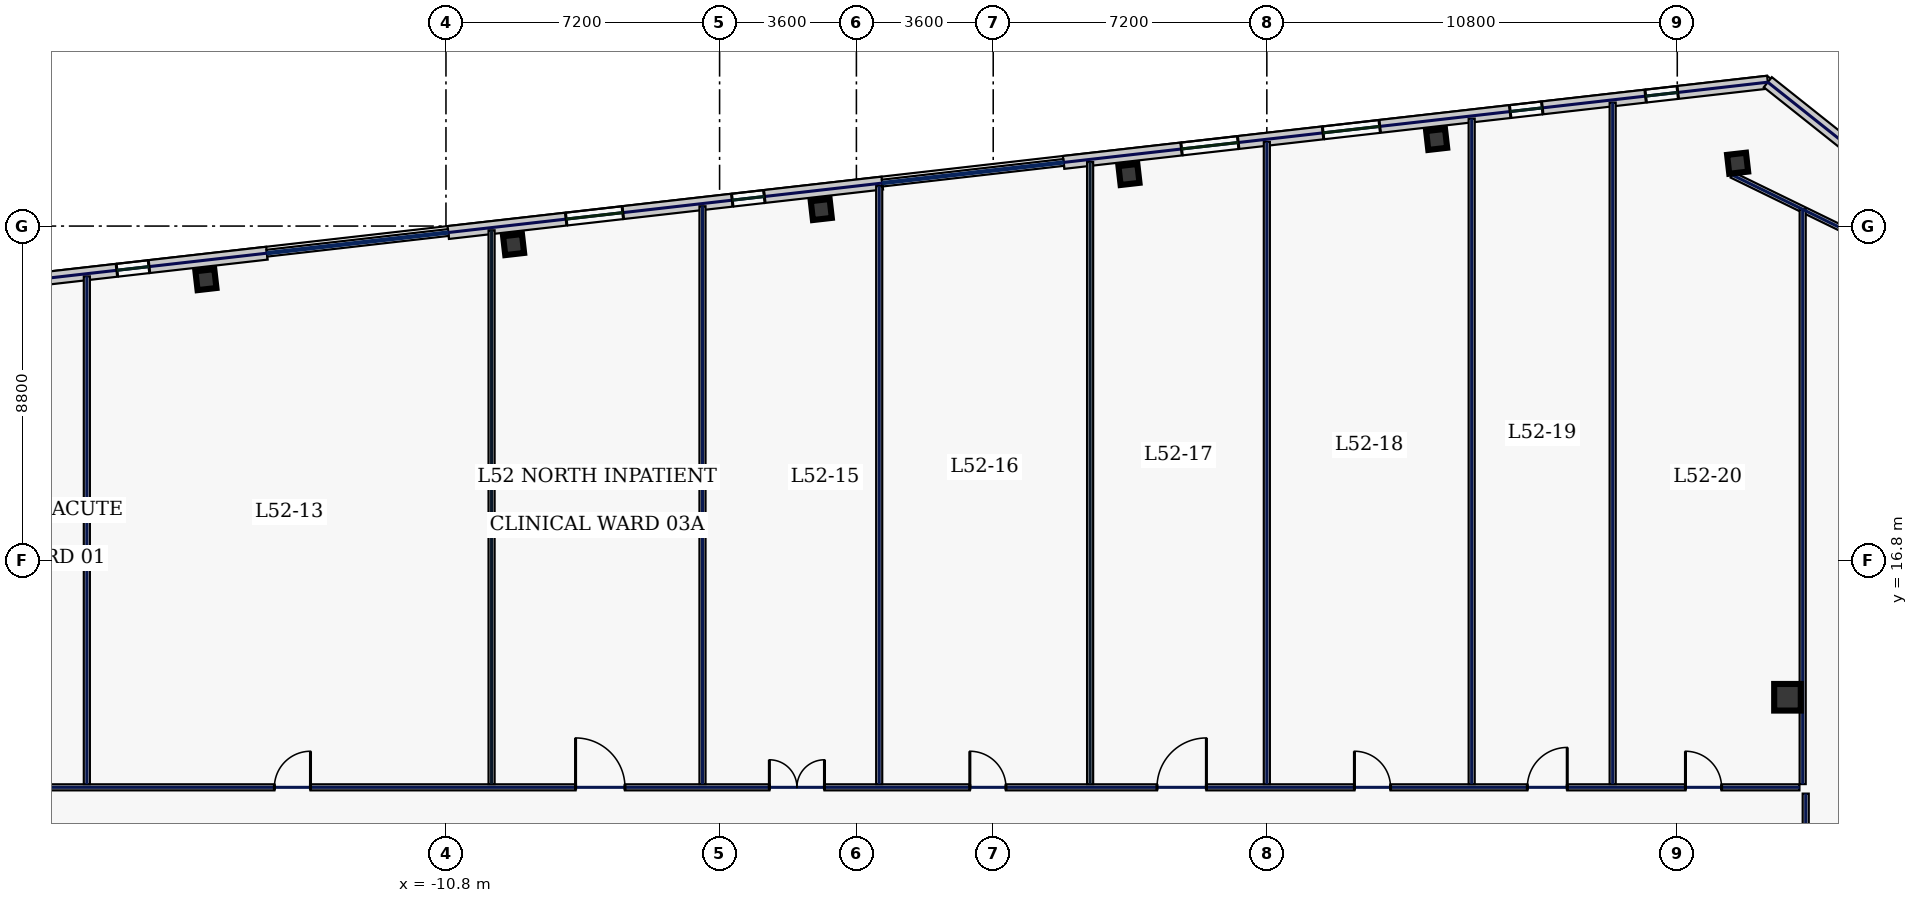
"""IFC4 building model, lengths in metres.
Left out: names, types, materials, properties, quantities, classifications, styles, units other than length and angle.
Written with IfcOpenShell. Run it as: python <this file> out.ifc"""

import sys

from ifc_helpers import new_model, si_unit, direction, frame, frame_2d, origin, origin_2d, place, context, subcontext, project, spatial, rectangle, hollow_rectangle, extrude, element, fill, save


model = new_model("IFC4")
c1 = context("Model", 3, precision=1e-05, world=origin(), true_north=direction((0.0, 1.0)))
c2 = subcontext(c1, "Body", "Model", "MODEL_VIEW")
j1 = project(units=[si_unit("LENGTHUNIT", "METRE"), si_unit("PLANEANGLEUNIT", "RADIAN")], contexts=[c1])
p1 = place(None, origin())
s1 = spatial("IfcSite", under=j1, at=p1, CompositionType="ELEMENT")
p2 = place(p1, origin())
s2 = spatial("IfcBuilding", under=s1, at=p2, CompositionType="ELEMENT")
p3 = place(p2, frame((0.0, 0.0, 226.2)))
s3 = spatial("IfcBuildingStorey", under=s2, at=p3, CompositionType="ELEMENT", Elevation=226.2)
p4 = place(p3, frame((24.5, 13.2, 0.0), z_axis=(0.0, 0.0, 1.0), x_axis=(1.0, 0.0, 0.0)))
e1 = element("IfcColumn", 1, at=p4, inside=s3, PredefinedType="COLUMN", context=c2, shape_type="SweptSolid", body=[
    extrude(hollow_rectangle(XDim=0.7, YDim=0.7, WallThickness=0.032, at=origin_2d()), origin(), (0.0, 0.0, 1.0), 3.74),
])
for number, where, z_axis, x_axis in (
    (2, (23.188, 27.253, 0.0), (0.0, 0.0, 1.0), (0.994, 0.113, 0.0)),
    (3, (15.269, 27.88, 0.0), (0.0, 0.0, 1.0), (0.994, 0.113, 0.0)),
    (4, (7.172, 26.958, 0.0), (0.0, 0.0, 1.0), (0.994, 0.113, 0.0)),
    (5, (-0.924, 26.035, 0.0), (0.0, 0.0, 1.0), (0.994, 0.113, 0.0)),
    (6, (-9.02, 25.113, 0.0), (0.0, 0.0, 1.0), (0.994, 0.113, 0.0)),
    (7, (-17.116, 24.19, 0.0), (0.0, 0.0, 1.0), (0.994, 0.113, 0.0)),
):
    element("IfcColumn", number, at=place(p3, frame(where, z_axis=z_axis, x_axis=x_axis)), inside=s3, PredefinedType="COLUMN", context=c2, shape_type="SweptSolid", body=[
        extrude(hollow_rectangle(XDim=0.5, YDim=0.5, WallThickness=0.025, at=origin_2d()), origin(), (0.0, 0.0, 1.0), 3.74),
    ])
p5 = place(p3, frame((23.983, 29.386, 0.0), z_axis=(0.0, 0.0, 1.0), x_axis=(-0.993572271362, -0.113199565282, 0.0)))
e8 = element("IfcWall", 8, at=p5, inside=s3, PredefinedType="STANDARD", context=c2, shape_type="SweptSolid", body=[
    extrude(rectangle(XDim=18.651, YDim=0.34, at=frame_2d((9.326, 0.0))), origin(), (0.0, 0.0, 1.0), 3.74),
])
p6 = place(p5, frame((14.027, 0.0, 0.83)))
e9 = element("IfcOpeningElement", 9, at=p6, cuts=e8, PredefinedType="OPENING", context=c2, shape_type="SweptSolid", body=[
    extrude(rectangle(XDim=1.5, YDim=2.0, at=frame_2d((0.75, 1.0))), frame((0.0, 0.18, 0.0), z_axis=(0.0, -1.0, 0.0), x_axis=(1.0, 0.0, 0.0)), (0.0, 0.0, 1.0), 0.36),
])
p7 = place(p5, frame((10.279, 0.0, 0.83)))
e10 = element("IfcOpeningElement", 10, at=p7, cuts=e8, PredefinedType="OPENING", context=c2, shape_type="SweptSolid", body=[
    extrude(rectangle(XDim=1.5, YDim=2.0, at=frame_2d((0.75, 1.0))), frame((0.0, 0.18, 0.0), z_axis=(0.0, -1.0, 0.0), x_axis=(1.0, 0.0, 0.0)), (0.0, 0.0, 1.0), 0.36),
])
p8 = place(p5, frame((5.973, 0.0, 0.83)))
e11 = element("IfcOpeningElement", 11, at=p8, cuts=e8, PredefinedType="OPENING", context=c2, shape_type="SweptSolid", body=[
    extrude(rectangle(XDim=0.85, YDim=1.85, at=frame_2d((0.425, 0.925))), frame((0.0, 0.18, 0.0), z_axis=(0.0, -1.0, 0.0), x_axis=(1.0, 0.0, 0.0)), (0.0, 0.0, 1.0), 0.36),
])
p9 = place(p5, frame((2.386, 0.0, 0.83)))
e12 = element("IfcOpeningElement", 12, at=p9, cuts=e8, PredefinedType="OPENING", context=c2, shape_type="SweptSolid", body=[
    extrude(rectangle(XDim=0.85, YDim=1.85, at=frame_2d((0.425, 0.925))), frame((0.0, 0.18, 0.0), z_axis=(0.0, -1.0, 0.0), x_axis=(1.0, 0.0, 0.0)), (0.0, 0.0, 1.0), 0.36),
])
p10 = place(p3, frame((0.682, 26.731, 0.0), z_axis=(0.0, 0.0, 1.0), x_axis=(-0.993571968199, -0.113202226169, 0.0)))
e13 = element("IfcWall", 13, at=p10, inside=s3, PredefinedType="STANDARD", context=c2, shape_type="SweptSolid", body=[
    extrude(rectangle(XDim=11.497, YDim=0.34, at=frame_2d((5.749, 0.0))), origin(), (0.0, 0.0, 1.0), 3.74),
])
p11 = place(p10, frame((6.873, 0.0, 0.83)))
e14 = element("IfcOpeningElement", 14, at=p11, cuts=e13, PredefinedType="OPENING", context=c2, shape_type="SweptSolid", body=[
    extrude(rectangle(XDim=1.5, YDim=2.0, at=frame_2d((0.75, 1.0))), frame((0.0, 0.18, 0.0), z_axis=(0.0, -1.0, 0.0), x_axis=(1.0, 0.0, 0.0)), (0.0, 0.0, 1.0), 0.36),
])
p12 = place(p10, frame((3.125, 0.0, 0.83)))
e15 = element("IfcOpeningElement", 15, at=p12, cuts=e13, PredefinedType="OPENING", context=c2, shape_type="SweptSolid", body=[
    extrude(rectangle(XDim=0.85, YDim=1.85, at=frame_2d((0.425, 0.925))), frame((0.0, 0.18, 0.0), z_axis=(0.0, -1.0, 0.0), x_axis=(1.0, 0.0, 0.0)), (0.0, 0.0, 1.0), 0.36),
])
p13 = place(p3, frame((-15.51, 24.886, 0.0), z_axis=(0.0, 0.0, 1.0), x_axis=(-0.993572271362, -0.113199565282, 0.0)))
e16 = element("IfcWall", 16, at=p13, inside=s3, PredefinedType="STANDARD", context=c2, shape_type="SweptSolid", body=[
    extrude(rectangle(XDim=18.651, YDim=0.34, at=frame_2d((9.326, 0.0))), origin(), (0.0, 0.0, 1.0), 3.74),
])
p14 = place(p13, frame((15.021, 0.0, 0.83)))
e17 = element("IfcOpeningElement", 17, at=p14, cuts=e16, PredefinedType="OPENING", context=c2, shape_type="SweptSolid", body=[
    extrude(rectangle(XDim=1.5, YDim=2.0, at=frame_2d((0.75, 1.0))), frame((0.0, 0.18, 0.0), z_axis=(0.0, -1.0, 0.0), x_axis=(1.0, 0.0, 0.0)), (0.0, 0.0, 1.0), 0.36),
])
p15 = place(p13, frame((11.273, 0.0, 0.83)))
e18 = element("IfcOpeningElement", 18, at=p15, cuts=e16, PredefinedType="OPENING", context=c2, shape_type="SweptSolid", body=[
    extrude(rectangle(XDim=1.5, YDim=2.0, at=frame_2d((0.75, 1.0))), frame((0.0, 0.18, 0.0), z_axis=(0.0, -1.0, 0.0), x_axis=(1.0, 0.0, 0.0)), (0.0, 0.0, 1.0), 0.36),
])
p16 = place(p13, frame((6.873, 0.0, 0.83)))
e19 = element("IfcOpeningElement", 19, at=p16, cuts=e16, PredefinedType="OPENING", context=c2, shape_type="SweptSolid", body=[
    extrude(rectangle(XDim=1.5, YDim=2.0, at=frame_2d((0.75, 1.0))), frame((0.0, 0.18, 0.0), z_axis=(0.0, -1.0, 0.0), x_axis=(1.0, 0.0, 0.0)), (0.0, 0.0, 1.0), 0.36),
])
p17 = place(p13, frame((3.125, 0.0, 0.83)))
e20 = element("IfcOpeningElement", 20, at=p17, cuts=e16, PredefinedType="OPENING", context=c2, shape_type="SweptSolid", body=[
    extrude(rectangle(XDim=0.85, YDim=1.85, at=frame_2d((0.425, 0.925))), frame((0.0, 0.18, 0.0), z_axis=(0.0, -1.0, 0.0), x_axis=(1.0, 0.0, 0.0)), (0.0, 0.0, 1.0), 0.36),
])
p18 = place(p3, frame((29.107, 25.31, 0.0), z_axis=(0.0, 0.0, 1.0), x_axis=(-0.78259733853, 0.62252823689, 0.0)))
e21 = element("IfcWall", 21, at=p18, inside=s3, PredefinedType="STANDARD", context=c2, shape_type="SweptSolid", body=[
    extrude(rectangle(XDim=6.548, YDim=0.34, at=frame_2d((3.274, 0.0))), origin(), (0.0, 0.0, 1.0), 3.74),
])
p19 = place(p3, frame((28.528, 24.271, 0.0), z_axis=(0.0, 0.0, 1.0), x_axis=(-0.898820692789, 0.438316509173, 0.0)))
e22 = element("IfcWall", 22, at=p19, inside=s3, PredefinedType="PARTITIONING", context=c2, shape_type="SweptSolid", body=[
    extrude(rectangle(XDim=6.107, YDim=0.16, at=frame_2d((3.053, 0.0))), origin(), (0.0, 0.0, 1.0), 3.74),
])
p20 = place(p3, frame((-24.815, 10.83, 0.0), z_axis=(0.0, 0.0, 1.0), x_axis=(1.0, 0.0, 0.0)))
e23 = element("IfcWall", 23, at=p20, inside=s3, PredefinedType="PARTITIONING", context=c2, shape_type="SweptSolid", body=[
    extrude(rectangle(XDim=49.63, YDim=0.16, at=frame_2d((24.815, 0.0))), origin(), (0.0, 0.0, 1.0), 3.74),
])
p21 = place(p20, frame((1.869, 0.0, 0.0)))
e24 = element("IfcOpeningElement", 24, at=p21, cuts=e23, PredefinedType="OPENING", context=c2, shape_type="SweptSolid", body=[
    extrude(rectangle(XDim=1.3, YDim=2.2, at=frame_2d((0.65, 1.1))), frame((0.0, 0.09, 0.0), z_axis=(0.0, -1.0, 0.0), x_axis=(1.0, 0.0, 0.0)), (0.0, 0.0, 1.0), 0.18),
])
p22 = place(p20, frame((9.5, 0.0, 0.0)))
e25 = element("IfcOpeningElement", 25, at=p22, cuts=e23, PredefinedType="OPENING", context=c2, shape_type="SweptSolid", body=[
    extrude(rectangle(XDim=0.95, YDim=2.2, at=frame_2d((0.475, 1.1))), frame((0.0, 0.09, 0.0), z_axis=(0.0, -1.0, 0.0), x_axis=(1.0, 0.0, 0.0)), (0.0, 0.0, 1.0), 0.18),
])
p23 = place(p20, frame((17.425, 0.0, 0.0)))
e26 = element("IfcOpeningElement", 26, at=p23, cuts=e23, PredefinedType="OPENING", context=c2, shape_type="SweptSolid", body=[
    extrude(rectangle(XDim=1.3, YDim=2.2, at=frame_2d((0.65, 1.1))), frame((0.0, 0.09, 0.0), z_axis=(0.0, -1.0, 0.0), x_axis=(1.0, 0.0, 0.0)), (0.0, 0.0, 1.0), 0.18),
])
p24 = place(p20, frame((22.525, 0.0, 0.0)))
e27 = element("IfcOpeningElement", 27, at=p24, cuts=e23, PredefinedType="OPENING", context=c2, shape_type="SweptSolid", body=[
    extrude(rectangle(XDim=1.45, YDim=2.2, at=frame_2d((0.725, 1.1))), frame((0.0, 0.09, 0.0), z_axis=(0.0, -1.0, 0.0), x_axis=(1.0, 0.0, 0.0)), (0.0, 0.0, 1.0), 0.18),
])
p25 = place(p20, frame((27.8, 0.0, 0.0)))
e28 = element("IfcOpeningElement", 28, at=p25, cuts=e23, PredefinedType="OPENING", context=c2, shape_type="SweptSolid", body=[
    extrude(rectangle(XDim=0.95, YDim=2.2, at=frame_2d((0.475, 1.1))), frame((0.0, 0.09, 0.0), z_axis=(0.0, -1.0, 0.0), x_axis=(1.0, 0.0, 0.0)), (0.0, 0.0, 1.0), 0.18),
])
p26 = place(p20, frame((32.725, 0.0, 0.0)))
e29 = element("IfcOpeningElement", 29, at=p26, cuts=e23, PredefinedType="OPENING", context=c2, shape_type="SweptSolid", body=[
    extrude(rectangle(XDim=1.3, YDim=2.2, at=frame_2d((0.65, 1.1))), frame((0.0, 0.09, 0.0), z_axis=(0.0, -1.0, 0.0), x_axis=(1.0, 0.0, 0.0)), (0.0, 0.0, 1.0), 0.18),
])
p27 = place(p20, frame((37.92, 0.0, 0.0)))
e30 = element("IfcOpeningElement", 30, at=p27, cuts=e23, PredefinedType="OPENING", context=c2, shape_type="SweptSolid", body=[
    extrude(rectangle(XDim=0.95, YDim=2.2, at=frame_2d((0.475, 1.1))), frame((0.0, 0.09, 0.0), z_axis=(0.0, -1.0, 0.0), x_axis=(1.0, 0.0, 0.0)), (0.0, 0.0, 1.0), 0.18),
])
p28 = place(p20, frame((42.47, 0.0, 0.0)))
e31 = element("IfcOpeningElement", 31, at=p28, cuts=e23, PredefinedType="OPENING", context=c2, shape_type="SweptSolid", body=[
    extrude(rectangle(XDim=1.05, YDim=2.2, at=frame_2d((0.525, 1.1))), frame((0.0, 0.09, 0.0), z_axis=(0.0, -1.0, 0.0), x_axis=(1.0, 0.0, 0.0)), (0.0, 0.0, 1.0), 0.18),
])
p29 = place(p20, frame((46.631, 0.0, 0.0)))
e32 = element("IfcOpeningElement", 32, at=p29, cuts=e23, PredefinedType="OPENING", context=c2, shape_type="SweptSolid", body=[
    extrude(rectangle(XDim=0.95, YDim=2.2, at=frame_2d((0.475, 1.1))), frame((0.0, 0.09, 0.0), z_axis=(0.0, -1.0, 0.0), x_axis=(1.0, 0.0, 0.0)), (0.0, 0.0, 1.0), 0.18),
])
p30 = place(p3, frame((24.98, 10.665, 0.0), z_axis=(0.0, 0.0, 1.0), x_axis=(0.0, -1.0, 0.0)))
e33 = element("IfcWall", 33, at=p30, inside=s3, PredefinedType="PARTITIONING", context=c2, shape_type="SweptSolid", body=[
    extrude(rectangle(XDim=2.98, YDim=0.16, at=frame_2d((1.49, 0.0))), origin(), (0.0, 0.0, 1.0), 3.74),
])
p31 = place(p30, frame((1.1, 0.0, 0.0)))
e34 = element("IfcOpeningElement", 34, at=p31, cuts=e33, PredefinedType="OPENING", context=c2, shape_type="SweptSolid", body=[
    extrude(rectangle(XDim=0.95, YDim=2.2, at=frame_2d((0.475, 1.1))), frame((0.0, 0.09, 0.0), z_axis=(0.0, -1.0, 0.0), x_axis=(1.0, 0.0, 0.0)), (0.0, 0.0, 1.0), 0.18),
])
p32 = place(p3, frame((24.9, 10.915, 0.0), z_axis=(0.0, 0.0, 1.0), x_axis=(0.0, 1.0, 0.0)))
e35 = element("IfcWall", 35, at=p32, inside=s3, PredefinedType="PARTITIONING", context=c2, shape_type="SweptSolid", body=[
    extrude(rectangle(XDim=15.129, YDim=0.16, at=frame_2d((7.565, 0.0))), origin(), (0.0, 0.0, 1.0), 3.74),
])
p33 = place(p3, frame((-20.25, 10.915, 0.0), z_axis=(0.0, 0.0, 1.0), x_axis=(0.0, 1.0, 0.0)))
e36 = element("IfcWall", 36, at=p33, inside=s3, PredefinedType="PARTITIONING", context=c2, shape_type="SweptSolid", body=[
    extrude(rectangle(XDim=13.361, YDim=0.16, at=frame_2d((6.681, 0.0))), origin(), (0.0, 0.0, 1.0), 3.74),
])
p34 = place(p3, frame((-9.6, 10.915, 0.0), z_axis=(0.0, 0.0, 1.0), x_axis=(0.0, 1.0, 0.0)))
e37 = element("IfcWall", 37, at=p34, inside=s3, PredefinedType="PARTITIONING", context=c2, shape_type="SweptSolid", body=[
    extrude(rectangle(XDim=14.574, YDim=0.16, at=frame_2d((7.287, 0.0))), origin(), (0.0, 0.0, 1.0), 1.535),
])
p35 = place(p3, frame((0.6, 10.915, 0.0), z_axis=(0.0, 0.0, 1.0), x_axis=(0.0, 1.0, 0.0)))
e38 = element("IfcWall", 38, at=p35, inside=s3, PredefinedType="PARTITIONING", context=c2, shape_type="SweptSolid", body=[
    extrude(rectangle(XDim=15.737, YDim=0.16, at=frame_2d((7.868, 0.0))), origin(), (0.0, 0.0, 1.0), 3.74),
])
p36 = place(p3, frame((10.8, 10.915, 0.0), z_axis=(0.0, 0.0, 1.0), x_axis=(0.0, 1.0, 0.0)))
e39 = element("IfcWall", 39, at=p36, inside=s3, PredefinedType="PARTITIONING", context=c2, shape_type="SweptSolid", body=[
    extrude(rectangle(XDim=16.899, YDim=0.16, at=frame_2d((8.449, 0.0))), origin(), (0.0, 0.0, 1.0), 3.74),
])
p37 = place(p3, frame((19.9, 10.915, 0.0), z_axis=(0.0, 0.0, 1.0), x_axis=(0.0, 1.0, 0.0)))
e40 = element("IfcWall", 40, at=p37, inside=s3, PredefinedType="PARTITIONING", context=c2, shape_type="SweptSolid", body=[
    extrude(rectangle(XDim=17.936, YDim=0.16, at=frame_2d((8.968, 0.0))), origin(), (0.0, 0.0, 1.0), 3.74),
])
p38 = place(p3, frame((-4.05, 10.915, 0.0), z_axis=(0.0, 0.0, 1.0), x_axis=(0.0, 1.0, 0.0)))
e41 = element("IfcWall", 41, at=p38, inside=s3, PredefinedType="PARTITIONING", context=c2, shape_type="SweptSolid", body=[
    extrude(rectangle(XDim=15.207, YDim=0.16, at=frame_2d((7.604, 0.0))), origin(), (0.0, 0.0, 1.0), 3.74),
])
p39 = place(p3, frame((6.15, 10.915, 0.0), z_axis=(0.0, 0.0, 1.0), x_axis=(0.0, 1.0, 0.0)))
e42 = element("IfcWall", 42, at=p39, inside=s3, PredefinedType="PARTITIONING", context=c2, shape_type="SweptSolid", body=[
    extrude(rectangle(XDim=16.369, YDim=0.16, at=frame_2d((8.185, 0.0))), origin(), (0.0, 0.0, 1.0), 1.535),
])
p40 = place(p3, frame((16.19, 10.915, 0.0), z_axis=(0.0, 0.0, 1.0), x_axis=(0.0, 1.0, 0.0)))
e43 = element("IfcWall", 43, at=p40, inside=s3, PredefinedType="PARTITIONING", context=c2, shape_type="SweptSolid", body=[
    extrude(rectangle(XDim=17.513, YDim=0.16, at=frame_2d((8.756, 0.0))), origin(), (0.0, 0.0, 1.0), 3.74),
])
p41 = place(p6, origin())
e44 = element("IfcWindow", 44, at=p41, inside=s3, PartitioningType="SINGLE_PANEL", PredefinedType="WINDOW", context=c2, shape_type="SweptSolid", body=[
    extrude(rectangle(XDim=1.5, YDim=2.0, at=frame_2d((0.75, 1.0))), frame((0.0, 0.03, 0.0), z_axis=(0.0, -1.0, 0.0), x_axis=(1.0, 0.0, 0.0)), (0.0, 0.0, 1.0), 0.06),
])
fill(e9, e44)
p42 = place(p7, origin())
e45 = element("IfcWindow", 45, at=p42, inside=s3, PartitioningType="SINGLE_PANEL", PredefinedType="WINDOW", context=c2, shape_type="SweptSolid", body=[
    extrude(rectangle(XDim=1.5, YDim=2.0, at=frame_2d((0.75, 1.0))), frame((0.0, 0.03, 0.0), z_axis=(0.0, -1.0, 0.0), x_axis=(1.0, 0.0, 0.0)), (0.0, 0.0, 1.0), 0.06),
])
fill(e10, e45)
p43 = place(p8, origin())
e46 = element("IfcWindow", 46, at=p43, inside=s3, PartitioningType="SINGLE_PANEL", PredefinedType="WINDOW", context=c2, shape_type="SweptSolid", body=[
    extrude(rectangle(XDim=0.85, YDim=1.85, at=frame_2d((0.425, 0.925))), frame((0.0, 0.03, 0.0), z_axis=(0.0, -1.0, 0.0), x_axis=(1.0, 0.0, 0.0)), (0.0, 0.0, 1.0), 0.06),
])
fill(e11, e46)
p44 = place(p9, origin())
e47 = element("IfcWindow", 47, at=p44, inside=s3, PartitioningType="SINGLE_PANEL", PredefinedType="WINDOW", context=c2, shape_type="SweptSolid", body=[
    extrude(rectangle(XDim=0.85, YDim=1.85, at=frame_2d((0.425, 0.925))), frame((0.0, 0.03, 0.0), z_axis=(0.0, -1.0, 0.0), x_axis=(1.0, 0.0, 0.0)), (0.0, 0.0, 1.0), 0.06),
])
fill(e12, e47)
p45 = place(p11, origin())
e48 = element("IfcWindow", 48, at=p45, inside=s3, PartitioningType="SINGLE_PANEL", PredefinedType="WINDOW", context=c2, shape_type="SweptSolid", body=[
    extrude(rectangle(XDim=1.5, YDim=2.0, at=frame_2d((0.75, 1.0))), frame((0.0, 0.03, 0.0), z_axis=(0.0, -1.0, 0.0), x_axis=(1.0, 0.0, 0.0)), (0.0, 0.0, 1.0), 0.06),
])
fill(e14, e48)
p46 = place(p12, origin())
e49 = element("IfcWindow", 49, at=p46, inside=s3, PartitioningType="SINGLE_PANEL", PredefinedType="WINDOW", context=c2, shape_type="SweptSolid", body=[
    extrude(rectangle(XDim=0.85, YDim=1.85, at=frame_2d((0.425, 0.925))), frame((0.0, 0.03, 0.0), z_axis=(0.0, -1.0, 0.0), x_axis=(1.0, 0.0, 0.0)), (0.0, 0.0, 1.0), 0.06),
])
fill(e15, e49)
p47 = place(p17, origin())
e50 = element("IfcWindow", 50, at=p47, inside=s3, PartitioningType="SINGLE_PANEL", PredefinedType="WINDOW", context=c2, shape_type="SweptSolid", body=[
    extrude(rectangle(XDim=0.85, YDim=1.85, at=frame_2d((0.425, 0.925))), frame((0.0, 0.03, 0.0), z_axis=(0.0, -1.0, 0.0), x_axis=(1.0, 0.0, 0.0)), (0.0, 0.0, 1.0), 0.06),
])
fill(e20, e50)
p48 = place(p22, origin())
e51 = element("IfcDoor", 51, at=p48, inside=s3, OperationType="SINGLE_SWING_RIGHT", PredefinedType="DOOR", context=c2, shape_type="SweptSolid", body=[
    extrude(rectangle(XDim=0.95, YDim=2.2, at=frame_2d((0.475, 1.1))), frame((0.0, 0.025, 0.0), z_axis=(0.0, -1.0, 0.0), x_axis=(1.0, 0.0, 0.0)), (0.0, 0.0, 1.0), 0.05),
])
fill(e25, e51)
p49 = place(p23, origin())
e52 = element("IfcDoor", 52, at=p49, inside=s3, OperationType="SINGLE_SWING_LEFT", PredefinedType="DOOR", context=c2, shape_type="SweptSolid", body=[
    extrude(rectangle(XDim=1.3, YDim=2.2, at=frame_2d((0.65, 1.1))), frame((0.0, 0.025, 0.0), z_axis=(0.0, -1.0, 0.0), x_axis=(1.0, 0.0, 0.0)), (0.0, 0.0, 1.0), 0.05),
])
fill(e26, e52)
p50 = place(p24, origin())
e53 = element("IfcDoor", 53, at=p50, inside=s3, OperationType="DOUBLE_SWING_LEFT", PredefinedType="DOOR", context=c2, shape_type="SweptSolid", body=[
    extrude(rectangle(XDim=1.45, YDim=2.2, at=frame_2d((0.725, 1.1))), frame((0.0, 0.025, 0.0), z_axis=(0.0, -1.0, 0.0), x_axis=(1.0, 0.0, 0.0)), (0.0, 0.0, 1.0), 0.05),
])
fill(e27, e53)
p51 = place(p25, origin())
e54 = element("IfcDoor", 54, at=p51, inside=s3, OperationType="SINGLE_SWING_LEFT", PredefinedType="DOOR", context=c2, shape_type="SweptSolid", body=[
    extrude(rectangle(XDim=0.95, YDim=2.2, at=frame_2d((0.475, 1.1))), frame((0.0, 0.025, 0.0), z_axis=(0.0, -1.0, 0.0), x_axis=(1.0, 0.0, 0.0)), (0.0, 0.0, 1.0), 0.05),
])
fill(e28, e54)
p52 = place(p26, origin())
e55 = element("IfcDoor", 55, at=p52, inside=s3, OperationType="SINGLE_SWING_RIGHT", PredefinedType="DOOR", context=c2, shape_type="SweptSolid", body=[
    extrude(rectangle(XDim=1.3, YDim=2.2, at=frame_2d((0.65, 1.1))), frame((0.0, 0.025, 0.0), z_axis=(0.0, -1.0, 0.0), x_axis=(1.0, 0.0, 0.0)), (0.0, 0.0, 1.0), 0.05),
])
fill(e29, e55)
p53 = place(p27, origin())
e56 = element("IfcDoor", 56, at=p53, inside=s3, OperationType="SINGLE_SWING_LEFT", PredefinedType="DOOR", context=c2, shape_type="SweptSolid", body=[
    extrude(rectangle(XDim=0.95, YDim=2.2, at=frame_2d((0.475, 1.1))), frame((0.0, 0.025, 0.0), z_axis=(0.0, -1.0, 0.0), x_axis=(1.0, 0.0, 0.0)), (0.0, 0.0, 1.0), 0.05),
])
fill(e30, e56)
p54 = place(p28, origin())
e57 = element("IfcDoor", 57, at=p54, inside=s3, OperationType="SINGLE_SWING_RIGHT", PredefinedType="DOOR", context=c2, shape_type="SweptSolid", body=[
    extrude(rectangle(XDim=1.05, YDim=2.2, at=frame_2d((0.525, 1.1))), frame((0.0, 0.025, 0.0), z_axis=(0.0, -1.0, 0.0), x_axis=(1.0, 0.0, 0.0)), (0.0, 0.0, 1.0), 0.05),
])
fill(e31, e57)
p55 = place(p29, origin())
e58 = element("IfcDoor", 58, at=p55, inside=s3, OperationType="SINGLE_SWING_LEFT", PredefinedType="DOOR", context=c2, shape_type="SweptSolid", body=[
    extrude(rectangle(XDim=0.95, YDim=2.2, at=frame_2d((0.475, 1.1))), frame((0.0, 0.025, 0.0), z_axis=(0.0, -1.0, 0.0), x_axis=(1.0, 0.0, 0.0)), (0.0, 0.0, 1.0), 0.05),
])
fill(e32, e58)
save(model, sys.argv[1])
